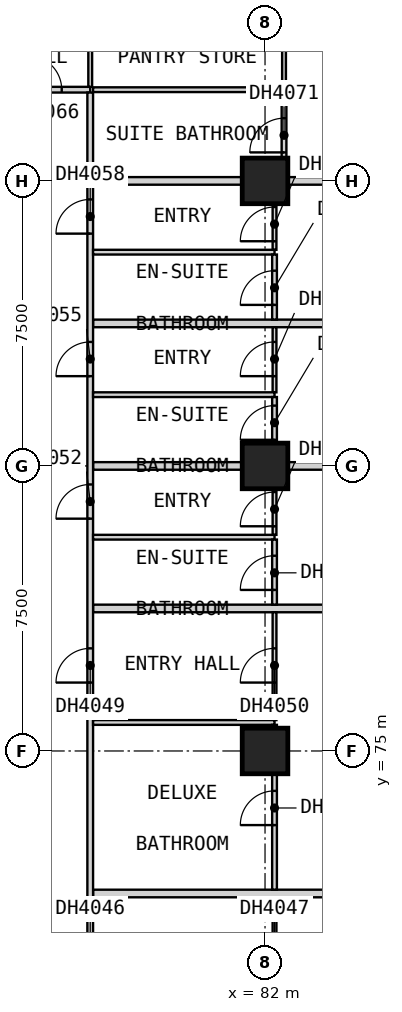
"""IFC4 building model, lengths in metres.
Left out: names, types, materials, properties, quantities, classifications, styles, units other than length and angle.
Written with IfcOpenShell. Run it as: python <this file> out.ifc"""

import sys

from ifc_helpers import new_model, si_unit, direction, frame, frame_2d, origin, origin_2d, place, context, subcontext, project, spatial, rectangle, extrude, element, fill, save


model = new_model("IFC4")
c1 = context("Model", 3, precision=1e-05, world=origin(), true_north=direction((0.0, 1.0)))
c2 = subcontext(c1, "Body", "Model", "MODEL_VIEW")
j1 = project(units=[si_unit("LENGTHUNIT", "METRE"), si_unit("PLANEANGLEUNIT", "RADIAN")], contexts=[c1])
p1 = place(None, origin())
s1 = spatial("IfcSite", under=j1, at=p1, CompositionType="ELEMENT")
p2 = place(p1, origin())
s2 = spatial("IfcBuilding", under=s1, at=p2, CompositionType="ELEMENT")
p3 = place(p2, frame((0.0, 0.0, 44.8)))
s3 = spatial("IfcBuildingStorey", under=s2, at=p3, CompositionType="ELEMENT", Elevation=44.8)
for number, where, z_axis, x_axis in (
    (1, (82.0, 75.0, 0.0), (0.0, 0.0, 1.0), (1.0, 0.0, 0.0)),
    (2, (82.0, 82.5, 0.0), (0.0, 0.0, 1.0), (1.0, 0.0, 0.0)),
    (3, (82.0, 90.0, 0.0), (0.0, 0.0, 1.0), (1.0, 0.0, 0.0)),
):
    element("IfcColumn", number, at=place(p3, frame(where, z_axis=z_axis, x_axis=x_axis)), inside=s3, PredefinedType="COLUMN", context=c2, shape_type="SweptSolid", body=[
        extrude(rectangle(XDim=1.2, YDim=1.2, at=origin_2d()), origin(), (0.0, 0.0, 1.0), 3.6),
    ])
for number, where, z_axis, x_axis in (
    (4, (77.475, 71.25, 0.0), (0.0, 0.0, 1.0), (1.0, 0.0, 0.0)),
    (5, (77.475, 78.75, 0.0), (0.0, 0.0, 1.0), (1.0, 0.0, 0.0)),
):
    element("IfcWall", number, at=place(p3, frame(where, z_axis=z_axis, x_axis=x_axis)), inside=s3, PredefinedType="PARTITIONING", context=c2, shape_type="SweptSolid", body=[
        extrude(rectangle(XDim=11.715, YDim=0.2, at=frame_2d((5.857, 0.0))), origin(), (0.0, 0.0, 1.0), 3.35),
    ])
p4 = place(p3, frame((77.475, 82.5, 0.0), z_axis=(0.0, 0.0, 1.0), x_axis=(1.0, 0.0, 0.0)))
e6 = element("IfcWall", 6, at=p4, inside=s3, PredefinedType="PARTITIONING", context=c2, shape_type="SweptSolid", body=[
    extrude(rectangle(XDim=12.525, YDim=0.2, at=frame_2d((6.262, 0.0))), origin(), (0.0, 0.0, 1.0), 3.35),
])
p5 = place(p3, frame((77.475, 86.25, 0.0), z_axis=(0.0, 0.0, 1.0), x_axis=(1.0, 0.0, 0.0)))
e7 = element("IfcWall", 7, at=p5, inside=s3, PredefinedType="PARTITIONING", context=c2, shape_type="SweptSolid", body=[
    extrude(rectangle(XDim=11.715, YDim=0.2, at=frame_2d((5.857, 0.0))), origin(), (0.0, 0.0, 1.0), 3.35),
])
p6 = place(p3, frame((77.475, 90.0, 0.0), z_axis=(0.0, 0.0, 1.0), x_axis=(1.0, 0.0, 0.0)))
e8 = element("IfcWall", 8, at=p6, inside=s3, PredefinedType="PARTITIONING", context=c2, shape_type="SweptSolid", body=[
    extrude(rectangle(XDim=12.525, YDim=0.2, at=frame_2d((6.262, 0.0))), origin(), (0.0, 0.0, 1.0), 3.35),
])
p7 = place(p3, frame((33.75, 92.4, 0.0), z_axis=(0.0, 0.0, 1.0), x_axis=(1.0, 0.0, 0.0)))
e9 = element("IfcWall", 9, at=p7, inside=s3, PredefinedType="PARTITIONING", context=c2, shape_type="SweptSolid", body=[
    extrude(rectangle(XDim=43.65, YDim=0.15, at=frame_2d((21.825, 0.0))), origin(), (0.0, 0.0, 1.0), 3.35),
])
p8 = place(p7, frame((5.175, 0.0, 0.0)))
e10 = element("IfcOpeningElement", 10, at=p8, cuts=e9, PredefinedType="OPENING", context=c2, shape_type="SweptSolid", body=[
    extrude(rectangle(XDim=0.9, YDim=2.1, at=frame_2d((0.45, 1.05))), frame((0.0, 0.085, 0.0), z_axis=(0.0, -1.0, 0.0), x_axis=(1.0, 0.0, 0.0)), (0.0, 0.0, 1.0), 0.17),
])
p9 = place(p7, frame((13.188, 0.0, 0.0)))
e11 = element("IfcOpeningElement", 11, at=p9, cuts=e9, PredefinedType="OPENING", context=c2, shape_type="SweptSolid", body=[
    extrude(rectangle(XDim=1.0, YDim=2.1, at=frame_2d((0.5, 1.05))), frame((0.0, 0.085, 0.0), z_axis=(0.0, -1.0, 0.0), x_axis=(1.0, 0.0, 0.0)), (0.0, 0.0, 1.0), 0.17),
])
p10 = place(p7, frame((20.55, 0.0, 0.0)))
e12 = element("IfcOpeningElement", 12, at=p10, cuts=e9, PredefinedType="OPENING", context=c2, shape_type="SweptSolid", body=[
    extrude(rectangle(XDim=0.9, YDim=2.1, at=frame_2d((0.45, 1.05))), frame((0.0, 0.085, 0.0), z_axis=(0.0, -1.0, 0.0), x_axis=(1.0, 0.0, 0.0)), (0.0, 0.0, 1.0), 0.17),
])
p11 = place(p7, frame((24.863, 0.0, 0.0)))
e13 = element("IfcOpeningElement", 13, at=p11, cuts=e9, PredefinedType="OPENING", context=c2, shape_type="SweptSolid", body=[
    extrude(rectangle(XDim=0.9, YDim=2.1, at=frame_2d((0.45, 1.05))), frame((0.0, 0.085, 0.0), z_axis=(0.0, -1.0, 0.0), x_axis=(1.0, 0.0, 0.0)), (0.0, 0.0, 1.0), 0.17),
])
p12 = place(p7, frame((31.8, 0.0, 0.0)))
e14 = element("IfcOpeningElement", 14, at=p12, cuts=e9, PredefinedType="OPENING", context=c2, shape_type="SweptSolid", body=[
    extrude(rectangle(XDim=0.9, YDim=2.1, at=frame_2d((0.45, 1.05))), frame((0.0, 0.085, 0.0), z_axis=(0.0, -1.0, 0.0), x_axis=(1.0, 0.0, 0.0)), (0.0, 0.0, 1.0), 0.17),
])
p13 = place(p7, frame((39.3, 0.0, 0.0)))
e15 = element("IfcOpeningElement", 15, at=p13, cuts=e9, PredefinedType="OPENING", context=c2, shape_type="SweptSolid", body=[
    extrude(rectangle(XDim=0.9, YDim=2.1, at=frame_2d((0.45, 1.05))), frame((0.0, 0.085, 0.0), z_axis=(0.0, -1.0, 0.0), x_axis=(1.0, 0.0, 0.0)), (0.0, 0.0, 1.0), 0.17),
])
p14 = place(p7, frame((42.0, 0.0, 0.0)))
e16 = element("IfcOpeningElement", 16, at=p14, cuts=e9, PredefinedType="OPENING", context=c2, shape_type="SweptSolid", body=[
    extrude(rectangle(XDim=0.9, YDim=2.1, at=frame_2d((0.45, 1.05))), frame((0.0, 0.085, 0.0), z_axis=(0.0, -1.0, 0.0), x_axis=(1.0, 0.0, 0.0)), (0.0, 0.0, 1.0), 0.17),
])
p15 = place(p3, frame((77.4, 50.175, 0.0), z_axis=(0.0, 0.0, 1.0), x_axis=(0.0, 1.0, 0.0)))
e17 = element("IfcWall", 17, at=p15, inside=s3, PredefinedType="PARTITIONING", context=c2, shape_type="SweptSolid", body=[
    extrude(rectangle(XDim=42.15, YDim=0.15, at=frame_2d((21.075, 0.0))), origin(), (0.0, 0.0, 1.0), 3.35),
])
p16 = place(p15, frame((8.012, 0.0, 0.0)))
e18 = element("IfcOpeningElement", 18, at=p16, cuts=e17, PredefinedType="OPENING", context=c2, shape_type="SweptSolid", body=[
    extrude(rectangle(XDim=1.0, YDim=2.1, at=frame_2d((0.5, 1.05))), frame((0.0, 0.085, 0.0), z_axis=(0.0, -1.0, 0.0), x_axis=(1.0, 0.0, 0.0)), (0.0, 0.0, 1.0), 0.17),
])
p17 = place(p15, frame((12.188, 0.0, 0.0)))
e19 = element("IfcOpeningElement", 19, at=p17, cuts=e17, PredefinedType="OPENING", context=c2, shape_type="SweptSolid", body=[
    extrude(rectangle(XDim=0.9, YDim=2.1, at=frame_2d((0.45, 1.05))), frame((0.0, 0.085, 0.0), z_axis=(0.0, -1.0, 0.0), x_axis=(1.0, 0.0, 0.0)), (0.0, 0.0, 1.0), 0.17),
])
p18 = place(p15, frame((19.125, 0.0, 0.0)))
e20 = element("IfcOpeningElement", 20, at=p18, cuts=e17, PredefinedType="OPENING", context=c2, shape_type="SweptSolid", body=[
    extrude(rectangle(XDim=0.9, YDim=2.1, at=frame_2d((0.45, 1.05))), frame((0.0, 0.085, 0.0), z_axis=(0.0, -1.0, 0.0), x_axis=(1.0, 0.0, 0.0)), (0.0, 0.0, 1.0), 0.17),
])
p19 = place(p15, frame((26.625, 0.0, 0.0)))
e21 = element("IfcOpeningElement", 21, at=p19, cuts=e17, PredefinedType="OPENING", context=c2, shape_type="SweptSolid", body=[
    extrude(rectangle(XDim=0.9, YDim=2.1, at=frame_2d((0.45, 1.05))), frame((0.0, 0.085, 0.0), z_axis=(0.0, -1.0, 0.0), x_axis=(1.0, 0.0, 0.0)), (0.0, 0.0, 1.0), 0.17),
])
p20 = place(p15, frame((30.938, 0.0, 0.0)))
e22 = element("IfcOpeningElement", 22, at=p20, cuts=e17, PredefinedType="OPENING", context=c2, shape_type="SweptSolid", body=[
    extrude(rectangle(XDim=0.9, YDim=2.1, at=frame_2d((0.45, 1.05))), frame((0.0, 0.085, 0.0), z_axis=(0.0, -1.0, 0.0), x_axis=(1.0, 0.0, 0.0)), (0.0, 0.0, 1.0), 0.17),
])
p21 = place(p15, frame((34.688, 0.0, 0.0)))
e23 = element("IfcOpeningElement", 23, at=p21, cuts=e17, PredefinedType="OPENING", context=c2, shape_type="SweptSolid", body=[
    extrude(rectangle(XDim=0.9, YDim=2.1, at=frame_2d((0.45, 1.05))), frame((0.0, 0.085, 0.0), z_axis=(0.0, -1.0, 0.0), x_axis=(1.0, 0.0, 0.0)), (0.0, 0.0, 1.0), 0.17),
])
p22 = place(p15, frame((38.438, 0.0, 0.0)))
e24 = element("IfcOpeningElement", 24, at=p22, cuts=e17, PredefinedType="OPENING", context=c2, shape_type="SweptSolid", body=[
    extrude(rectangle(XDim=0.9, YDim=2.1, at=frame_2d((0.45, 1.05))), frame((0.0, 0.085, 0.0), z_axis=(0.0, -1.0, 0.0), x_axis=(1.0, 0.0, 0.0)), (0.0, 0.0, 1.0), 0.17),
])
p23 = place(p3, frame((77.4, 92.475, 0.0), z_axis=(0.0, 0.0, 1.0), x_axis=(0.0, 1.0, 0.0)))
e25 = element("IfcWall", 25, at=p23, inside=s3, PredefinedType="PARTITIONING", context=c2, shape_type="SweptSolid", body=[
    extrude(rectangle(XDim=3.475, YDim=0.1, at=frame_2d((1.737, 0.0))), origin(), (0.0, 0.0, 1.0), 3.35),
])
p24 = place(p23, frame((1.275, 0.0, 0.0)))
e26 = element("IfcOpeningElement", 26, at=p24, cuts=e25, PredefinedType="OPENING", context=c2, shape_type="SweptSolid", body=[
    extrude(rectangle(XDim=0.9, YDim=2.1, at=frame_2d((0.45, 1.05))), frame((0.0, 0.06, 0.0), z_axis=(0.0, -1.0, 0.0), x_axis=(1.0, 0.0, 0.0)), (0.0, 0.0, 1.0), 0.12),
])
p25 = place(p3, frame((82.25, 68.312, 0.0), z_axis=(0.0, 0.0, 1.0), x_axis=(0.0, 1.0, 0.0)))
e27 = element("IfcWall", 27, at=p25, inside=s3, PredefinedType="PARTITIONING", context=c2, shape_type="SweptSolid", body=[
    extrude(rectangle(XDim=2.837, YDim=0.1, at=frame_2d((1.419, 0.0))), origin(), (0.0, 0.0, 1.0), 3.35),
])
p26 = place(p25, frame((0.988, 0.0, 0.0)))
e28 = element("IfcOpeningElement", 28, at=p26, cuts=e27, PredefinedType="OPENING", context=c2, shape_type="SweptSolid", body=[
    extrude(rectangle(XDim=0.9, YDim=2.1, at=frame_2d((0.45, 1.05))), frame((0.0, 0.06, 0.0), z_axis=(0.0, -1.0, 0.0), x_axis=(1.0, 0.0, 0.0)), (0.0, 0.0, 1.0), 0.12),
])
p27 = place(p3, frame((82.25, 75.812, 0.0), z_axis=(0.0, 0.0, 1.0), x_axis=(0.0, 1.0, 0.0)))
e29 = element("IfcWall", 29, at=p27, inside=s3, PredefinedType="PARTITIONING", context=c2, shape_type="SweptSolid", body=[
    extrude(rectangle(XDim=2.837, YDim=0.1, at=frame_2d((1.419, 0.0))), origin(), (0.0, 0.0, 1.0), 3.35),
])
p28 = place(p27, frame((0.988, 0.0, 0.0)))
e30 = element("IfcOpeningElement", 30, at=p28, cuts=e29, PredefinedType="OPENING", context=c2, shape_type="SweptSolid", body=[
    extrude(rectangle(XDim=0.9, YDim=2.1, at=frame_2d((0.45, 1.05))), frame((0.0, 0.06, 0.0), z_axis=(0.0, -1.0, 0.0), x_axis=(1.0, 0.0, 0.0)), (0.0, 0.0, 1.0), 0.12),
])
p29 = place(p3, frame((82.25, 80.688, 0.0), z_axis=(0.0, 0.0, 1.0), x_axis=(0.0, 1.0, 0.0)))
e31 = element("IfcWall", 31, at=p29, inside=s3, PredefinedType="PARTITIONING", context=c2, shape_type="SweptSolid", body=[
    extrude(rectangle(XDim=1.712, YDim=0.1, at=frame_2d((0.856, 0.0))), origin(), (0.0, 0.0, 1.0), 3.35),
])
p30 = place(p29, frame((0.225, 0.0, 0.0)))
e32 = element("IfcOpeningElement", 32, at=p30, cuts=e31, PredefinedType="OPENING", context=c2, shape_type="SweptSolid", body=[
    extrude(rectangle(XDim=0.9, YDim=2.1, at=frame_2d((0.45, 1.05))), frame((0.0, 0.06, 0.0), z_axis=(0.0, -1.0, 0.0), x_axis=(1.0, 0.0, 0.0)), (0.0, 0.0, 1.0), 0.12),
])
p31 = place(p3, frame((82.25, 84.438, 0.0), z_axis=(0.0, 0.0, 1.0), x_axis=(0.0, 1.0, 0.0)))
e33 = element("IfcWall", 33, at=p31, inside=s3, PredefinedType="PARTITIONING", context=c2, shape_type="SweptSolid", body=[
    extrude(rectangle(XDim=1.712, YDim=0.1, at=frame_2d((0.856, 0.0))), origin(), (0.0, 0.0, 1.0), 3.35),
])
p32 = place(p31, frame((0.425, 0.0, 0.0)))
e34 = element("IfcOpeningElement", 34, at=p32, cuts=e33, PredefinedType="OPENING", context=c2, shape_type="SweptSolid", body=[
    extrude(rectangle(XDim=0.9, YDim=2.1, at=frame_2d((0.45, 1.05))), frame((0.0, 0.06, 0.0), z_axis=(0.0, -1.0, 0.0), x_axis=(1.0, 0.0, 0.0)), (0.0, 0.0, 1.0), 0.12),
])
p33 = place(p3, frame((82.25, 88.188, 0.0), z_axis=(0.0, 0.0, 1.0), x_axis=(0.0, 1.0, 0.0)))
e35 = element("IfcWall", 35, at=p33, inside=s3, PredefinedType="PARTITIONING", context=c2, shape_type="SweptSolid", body=[
    extrude(rectangle(XDim=1.712, YDim=0.1, at=frame_2d((0.856, 0.0))), origin(), (0.0, 0.0, 1.0), 3.35),
])
p34 = place(p33, frame((0.225, 0.0, 0.0)))
e36 = element("IfcOpeningElement", 36, at=p34, cuts=e35, PredefinedType="OPENING", context=c2, shape_type="SweptSolid", body=[
    extrude(rectangle(XDim=0.9, YDim=2.1, at=frame_2d((0.45, 1.05))), frame((0.0, 0.06, 0.0), z_axis=(0.0, -1.0, 0.0), x_axis=(1.0, 0.0, 0.0)), (0.0, 0.0, 1.0), 0.12),
])
p35 = place(p3, frame((82.5, 92.462, 0.0), z_axis=(0.0, 0.0, 1.0), x_axis=(0.0, 1.0, 0.0)))
e37 = element("IfcWall", 37, at=p35, inside=s3, PredefinedType="PARTITIONING", context=c2, shape_type="SweptSolid", body=[
    extrude(rectangle(XDim=11.728, YDim=0.1, at=frame_2d((5.864, 0.0))), origin(), (0.0, 0.0, 1.0), 3.35),
])
p36 = place(p35, frame((9.837, 0.0, 0.0)))
e38 = element("IfcOpeningElement", 38, at=p36, cuts=e37, PredefinedType="OPENING", context=c2, shape_type="SweptSolid", body=[
    extrude(rectangle(XDim=0.9, YDim=2.1, at=frame_2d((0.45, 1.05))), frame((0.0, 0.06, 0.0), z_axis=(0.0, -1.0, 0.0), x_axis=(1.0, 0.0, 0.0)), (0.0, 0.0, 1.0), 0.12),
])
p37 = place(p35, frame((1.288, 0.0, 0.0)))
e39 = element("IfcOpeningElement", 39, at=p37, cuts=e37, PredefinedType="OPENING", context=c2, shape_type="SweptSolid", body=[
    extrude(rectangle(XDim=0.9, YDim=2.1, at=frame_2d((0.45, 1.05))), frame((0.0, 0.06, 0.0), z_axis=(0.0, -1.0, 0.0), x_axis=(1.0, 0.0, 0.0)), (0.0, 0.0, 1.0), 0.12),
])
for number, where, z_axis, x_axis in (
    (40, (77.475, 75.75, 0.0), (0.0, 0.0, 1.0), (1.0, 0.0, 0.0)),
    (41, (77.475, 80.625, 0.0), (0.0, 0.0, 1.0), (1.0, 0.0, 0.0)),
    (42, (77.475, 84.375, 0.0), (0.0, 0.0, 1.0), (1.0, 0.0, 0.0)),
    (43, (77.475, 88.125, 0.0), (0.0, 0.0, 1.0), (1.0, 0.0, 0.0)),
):
    element("IfcWall", number, at=place(p3, frame(where, z_axis=z_axis, x_axis=x_axis)), inside=s3, PredefinedType="PARTITIONING", context=c2, shape_type="SweptSolid", body=[
        extrude(rectangle(XDim=4.775, YDim=0.125, at=frame_2d((2.387, 0.0))), origin(), (0.0, 0.0, 1.0), 3.35),
    ])
p38 = place(p3, frame((77.475, 92.4, 0.0), z_axis=(0.0, 0.0, 1.0), x_axis=(1.0, 0.0, 0.0)))
e44 = element("IfcWall", 44, at=p38, inside=s3, PredefinedType="PARTITIONING", context=c2, shape_type="SweptSolid", body=[
    extrude(rectangle(XDim=5.025, YDim=0.125, at=frame_2d((2.512, 0.0))), origin(), (0.0, 0.0, 1.0), 3.35),
])
p39 = place(p3, frame((82.25, 71.35, 0.0), z_axis=(0.0, 0.0, 1.0), x_axis=(0.0, 1.0, 0.0)))
e45 = element("IfcWall", 45, at=p39, inside=s3, PredefinedType="PARTITIONING", context=c2, shape_type="SweptSolid", body=[
    extrude(rectangle(XDim=4.337, YDim=0.125, at=frame_2d((2.169, 0.0))), origin(), (0.0, 0.0, 1.0), 3.35),
])
p40 = place(p39, frame((1.7, 0.0, 0.0)))
e46 = element("IfcOpeningElement", 46, at=p40, cuts=e45, PredefinedType="OPENING", context=c2, shape_type="SweptSolid", body=[
    extrude(rectangle(XDim=0.9, YDim=2.1, at=frame_2d((0.45, 1.05))), frame((0.0, 0.073, 0.0), z_axis=(0.0, -1.0, 0.0), x_axis=(1.0, 0.0, 0.0)), (0.0, 0.0, 1.0), 0.145),
])
p41 = place(p3, frame((82.25, 78.85, 0.0), z_axis=(0.0, 0.0, 1.0), x_axis=(0.0, 1.0, 0.0)))
e47 = element("IfcWall", 47, at=p41, inside=s3, PredefinedType="PARTITIONING", context=c2, shape_type="SweptSolid", body=[
    extrude(rectangle(XDim=1.712, YDim=0.125, at=frame_2d((0.856, 0.0))), origin(), (0.0, 0.0, 1.0), 3.35),
])
p42 = place(p41, frame((0.387, 0.0, 0.0)))
e48 = element("IfcOpeningElement", 48, at=p42, cuts=e47, PredefinedType="OPENING", context=c2, shape_type="SweptSolid", body=[
    extrude(rectangle(XDim=0.9, YDim=2.1, at=frame_2d((0.45, 1.05))), frame((0.0, 0.073, 0.0), z_axis=(0.0, -1.0, 0.0), x_axis=(1.0, 0.0, 0.0)), (0.0, 0.0, 1.0), 0.145),
])
p43 = place(p3, frame((82.25, 82.6, 0.0), z_axis=(0.0, 0.0, 1.0), x_axis=(0.0, 1.0, 0.0)))
e49 = element("IfcWall", 49, at=p43, inside=s3, PredefinedType="PARTITIONING", context=c2, shape_type="SweptSolid", body=[
    extrude(rectangle(XDim=1.712, YDim=0.125, at=frame_2d((0.856, 0.0))), origin(), (0.0, 0.0, 1.0), 3.35),
])
p44 = place(p43, frame((0.587, 0.0, 0.0)))
e50 = element("IfcOpeningElement", 50, at=p44, cuts=e49, PredefinedType="OPENING", context=c2, shape_type="SweptSolid", body=[
    extrude(rectangle(XDim=0.9, YDim=2.1, at=frame_2d((0.45, 1.05))), frame((0.0, 0.073, 0.0), z_axis=(0.0, -1.0, 0.0), x_axis=(1.0, 0.0, 0.0)), (0.0, 0.0, 1.0), 0.145),
])
p45 = place(p3, frame((82.25, 86.35, 0.0), z_axis=(0.0, 0.0, 1.0), x_axis=(0.0, 1.0, 0.0)))
e51 = element("IfcWall", 51, at=p45, inside=s3, PredefinedType="PARTITIONING", context=c2, shape_type="SweptSolid", body=[
    extrude(rectangle(XDim=1.712, YDim=0.125, at=frame_2d((0.856, 0.0))), origin(), (0.0, 0.0, 1.0), 3.35),
])
p46 = place(p45, frame((0.387, 0.0, 0.0)))
e52 = element("IfcOpeningElement", 52, at=p46, cuts=e51, PredefinedType="OPENING", context=c2, shape_type="SweptSolid", body=[
    extrude(rectangle(XDim=0.9, YDim=2.1, at=frame_2d((0.45, 1.05))), frame((0.0, 0.073, 0.0), z_axis=(0.0, -1.0, 0.0), x_axis=(1.0, 0.0, 0.0)), (0.0, 0.0, 1.0), 0.145),
])
p47 = place(p3, frame((82.5, 90.1, 0.0), z_axis=(0.0, 0.0, 1.0), x_axis=(0.0, 1.0, 0.0)))
e53 = element("IfcWall", 53, at=p47, inside=s3, PredefinedType="PARTITIONING", context=c2, shape_type="SweptSolid", body=[
    extrude(rectangle(XDim=2.237, YDim=0.125, at=frame_2d((1.119, 0.0))), origin(), (0.0, 0.0, 1.0), 3.35),
])
p48 = place(p47, frame((0.65, 0.0, 0.0)))
e54 = element("IfcOpeningElement", 54, at=p48, cuts=e53, PredefinedType="OPENING", context=c2, shape_type="SweptSolid", body=[
    extrude(rectangle(XDim=0.9, YDim=2.1, at=frame_2d((0.45, 1.05))), frame((0.0, 0.073, 0.0), z_axis=(0.0, -1.0, 0.0), x_axis=(1.0, 0.0, 0.0)), (0.0, 0.0, 1.0), 0.145),
])
p49 = place(p40, origin())
e55 = element("IfcDoor", 55, at=p49, inside=s3, OperationType="SINGLE_SWING_LEFT", PredefinedType="DOOR", context=c2, shape_type="SweptSolid", body=[
    extrude(rectangle(XDim=0.9, YDim=2.1, at=frame_2d((0.45, 1.05))), frame((0.0, 0.025, 0.0), z_axis=(0.0, -1.0, 0.0), x_axis=(1.0, 0.0, 0.0)), (0.0, 0.0, 1.0), 0.05),
])
fill(e46, e55)
p50 = place(p19, origin())
e56 = element("IfcDoor", 56, at=p50, inside=s3, OperationType="SINGLE_SWING_RIGHT", PredefinedType="DOOR", context=c2, shape_type="SweptSolid", body=[
    extrude(rectangle(XDim=0.9, YDim=2.1, at=frame_2d((0.45, 1.05))), frame((0.0, 0.025, 0.0), z_axis=(0.0, -1.0, 0.0), x_axis=(1.0, 0.0, 0.0)), (0.0, 0.0, 1.0), 0.05),
])
fill(e21, e56)
p51 = place(p28, origin())
e57 = element("IfcDoor", 57, at=p51, inside=s3, OperationType="SINGLE_SWING_LEFT", PredefinedType="DOOR", context=c2, shape_type="SweptSolid", body=[
    extrude(rectangle(XDim=0.9, YDim=2.1, at=frame_2d((0.45, 1.05))), frame((0.0, 0.025, 0.0), z_axis=(0.0, -1.0, 0.0), x_axis=(1.0, 0.0, 0.0)), (0.0, 0.0, 1.0), 0.05),
])
fill(e30, e57)
p52 = place(p42, origin())
e58 = element("IfcDoor", 58, at=p52, inside=s3, OperationType="SINGLE_SWING_LEFT", PredefinedType="DOOR", context=c2, shape_type="SweptSolid", body=[
    extrude(rectangle(XDim=0.9, YDim=2.1, at=frame_2d((0.45, 1.05))), frame((0.0, 0.025, 0.0), z_axis=(0.0, -1.0, 0.0), x_axis=(1.0, 0.0, 0.0)), (0.0, 0.0, 1.0), 0.05),
])
fill(e48, e58)
p53 = place(p20, origin())
e59 = element("IfcDoor", 59, at=p53, inside=s3, OperationType="SINGLE_SWING_RIGHT", PredefinedType="DOOR", context=c2, shape_type="SweptSolid", body=[
    extrude(rectangle(XDim=0.9, YDim=2.1, at=frame_2d((0.45, 1.05))), frame((0.0, 0.025, 0.0), z_axis=(0.0, -1.0, 0.0), x_axis=(1.0, 0.0, 0.0)), (0.0, 0.0, 1.0), 0.05),
])
fill(e22, e59)
p54 = place(p30, origin())
e60 = element("IfcDoor", 60, at=p54, inside=s3, OperationType="SINGLE_SWING_LEFT", PredefinedType="DOOR", context=c2, shape_type="SweptSolid", body=[
    extrude(rectangle(XDim=0.9, YDim=2.1, at=frame_2d((0.45, 1.05))), frame((0.0, 0.025, 0.0), z_axis=(0.0, -1.0, 0.0), x_axis=(1.0, 0.0, 0.0)), (0.0, 0.0, 1.0), 0.05),
])
fill(e32, e60)
p55 = place(p44, origin())
e61 = element("IfcDoor", 61, at=p55, inside=s3, OperationType="SINGLE_SWING_RIGHT", PredefinedType="DOOR", context=c2, shape_type="SweptSolid", body=[
    extrude(rectangle(XDim=0.9, YDim=2.1, at=frame_2d((0.45, 1.05))), frame((0.0, 0.025, 0.0), z_axis=(0.0, -1.0, 0.0), x_axis=(1.0, 0.0, 0.0)), (0.0, 0.0, 1.0), 0.05),
])
fill(e50, e61)
p56 = place(p21, origin())
e62 = element("IfcDoor", 62, at=p56, inside=s3, OperationType="SINGLE_SWING_RIGHT", PredefinedType="DOOR", context=c2, shape_type="SweptSolid", body=[
    extrude(rectangle(XDim=0.9, YDim=2.1, at=frame_2d((0.45, 1.05))), frame((0.0, 0.025, 0.0), z_axis=(0.0, -1.0, 0.0), x_axis=(1.0, 0.0, 0.0)), (0.0, 0.0, 1.0), 0.05),
])
fill(e23, e62)
p57 = place(p32, origin())
e63 = element("IfcDoor", 63, at=p57, inside=s3, OperationType="SINGLE_SWING_LEFT", PredefinedType="DOOR", context=c2, shape_type="SweptSolid", body=[
    extrude(rectangle(XDim=0.9, YDim=2.1, at=frame_2d((0.45, 1.05))), frame((0.0, 0.025, 0.0), z_axis=(0.0, -1.0, 0.0), x_axis=(1.0, 0.0, 0.0)), (0.0, 0.0, 1.0), 0.05),
])
fill(e34, e63)
p58 = place(p46, origin())
e64 = element("IfcDoor", 64, at=p58, inside=s3, OperationType="SINGLE_SWING_LEFT", PredefinedType="DOOR", context=c2, shape_type="SweptSolid", body=[
    extrude(rectangle(XDim=0.9, YDim=2.1, at=frame_2d((0.45, 1.05))), frame((0.0, 0.025, 0.0), z_axis=(0.0, -1.0, 0.0), x_axis=(1.0, 0.0, 0.0)), (0.0, 0.0, 1.0), 0.05),
])
fill(e52, e64)
p59 = place(p22, origin())
e65 = element("IfcDoor", 65, at=p59, inside=s3, OperationType="SINGLE_SWING_RIGHT", PredefinedType="DOOR", context=c2, shape_type="SweptSolid", body=[
    extrude(rectangle(XDim=0.9, YDim=2.1, at=frame_2d((0.45, 1.05))), frame((0.0, 0.025, 0.0), z_axis=(0.0, -1.0, 0.0), x_axis=(1.0, 0.0, 0.0)), (0.0, 0.0, 1.0), 0.05),
])
fill(e24, e65)
p60 = place(p34, origin())
e66 = element("IfcDoor", 66, at=p60, inside=s3, OperationType="SINGLE_SWING_LEFT", PredefinedType="DOOR", context=c2, shape_type="SweptSolid", body=[
    extrude(rectangle(XDim=0.9, YDim=2.1, at=frame_2d((0.45, 1.05))), frame((0.0, 0.025, 0.0), z_axis=(0.0, -1.0, 0.0), x_axis=(1.0, 0.0, 0.0)), (0.0, 0.0, 1.0), 0.05),
])
fill(e36, e66)
p61 = place(p14, origin())
e67 = element("IfcDoor", 67, at=p61, inside=s3, OperationType="SINGLE_SWING_RIGHT", PredefinedType="DOOR", context=c2, shape_type="SweptSolid", body=[
    extrude(rectangle(XDim=0.9, YDim=2.1, at=frame_2d((0.45, 1.05))), frame((0.0, 0.025, 0.0), z_axis=(0.0, -1.0, 0.0), x_axis=(1.0, 0.0, 0.0)), (0.0, 0.0, 1.0), 0.05),
])
fill(e16, e67)
p62 = place(p48, origin())
e68 = element("IfcDoor", 68, at=p62, inside=s3, OperationType="SINGLE_SWING_LEFT", PredefinedType="DOOR", context=c2, shape_type="SweptSolid", body=[
    extrude(rectangle(XDim=0.9, YDim=2.1, at=frame_2d((0.45, 1.05))), frame((0.0, 0.025, 0.0), z_axis=(0.0, -1.0, 0.0), x_axis=(1.0, 0.0, 0.0)), (0.0, 0.0, 1.0), 0.05),
])
fill(e54, e68)
save(model, sys.argv[1])
